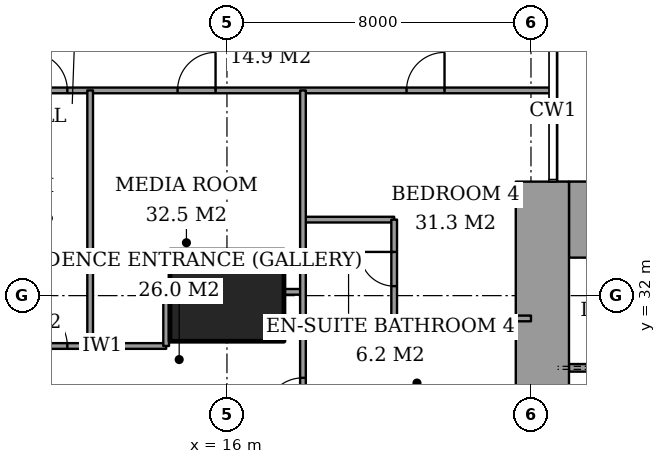
"""IFC4 building model, lengths in metres.
Left out: names, types, materials, properties, quantities, classifications, styles, units other than length and angle.
Written with IfcOpenShell. Run it as: python <this file> out.ifc"""

import sys

from ifc_helpers import new_model, si_unit, direction, frame, frame_2d, origin, origin_2d, place, context, subcontext, project, spatial, rectangle, extrude, element, fill, save


model = new_model("IFC4")
c1 = context("Model", 3, precision=1e-05, world=origin(), true_north=direction((0.0, 1.0)))
c2 = subcontext(c1, "Body", "Model", "MODEL_VIEW")
j1 = project(units=[si_unit("LENGTHUNIT", "METRE"), si_unit("PLANEANGLEUNIT", "RADIAN")], contexts=[c1])
p1 = place(None, origin())
s1 = spatial("IfcSite", under=j1, at=p1, CompositionType="ELEMENT")
p2 = place(p1, origin())
s2 = spatial("IfcBuilding", under=s1, at=p2, CompositionType="ELEMENT")
p3 = place(p2, frame((0.0, 0.0, 196.6)))
s3 = spatial("IfcBuildingStorey", under=s2, at=p3, CompositionType="ELEMENT", Elevation=196.6)
p4 = place(p3, frame((16.0, 32.0, 0.0), z_axis=(0.0, 0.0, 1.0), x_axis=(1.0, 0.0, 0.0)))
e1 = element("IfcColumn", 1, at=p4, inside=s3, PredefinedType="COLUMN", context=c2, shape_type="SweptSolid", body=[
    extrude(rectangle(XDim=3.0, YDim=2.4, at=origin_2d()), origin(), (0.0, 0.0, 1.0), 3.6),
])
p5 = place(p3, frame((25.0, 34.0, 0.0), z_axis=(0.0, 0.0, 1.0), x_axis=(1.0, 0.0, 0.0)))
e2 = element("IfcWall", 2, at=p5, inside=s3, PredefinedType="SHEAR", context=c2, shape_type="SweptSolid", body=[
    extrude(rectangle(XDim=3.15, YDim=2.0, at=frame_2d((1.575, 0.0))), origin(), (0.0, 0.0, 1.0), 3.6),
])
p6 = place(p3, frame((24.3, 23.15, 0.0), z_axis=(0.0, 0.0, 1.0), x_axis=(0.0, 1.0, 0.0)))
e3 = element("IfcWall", 3, at=p6, inside=s3, PredefinedType="SHEAR", context=c2, shape_type="SweptSolid", body=[
    extrude(rectangle(XDim=11.85, YDim=1.4, at=frame_2d((5.925, 0.0))), origin(), (0.0, 0.0, 1.0), 3.6),
])
p7 = place(p6, frame((0.75, 0.0, 0.0)))
e4 = element("IfcOpeningElement", 4, at=p7, cuts=e3, PredefinedType="OPENING", context=c2, shape_type="SweptSolid", body=[
    extrude(rectangle(XDim=1.8, YDim=2.4, at=frame_2d((0.9, 1.2))), frame((0.0, 0.71, 0.0), z_axis=(0.0, -1.0, 0.0), x_axis=(1.0, 0.0, 0.0)), (0.0, 0.0, 1.0), 1.42),
])
p8 = place(p3, frame((10.2, 30.675, 0.0), z_axis=(0.0, 0.0, 1.0), x_axis=(1.0, 0.0, 0.0)))
e5 = element("IfcWall", 5, at=p8, inside=s3, PredefinedType="PARTITIONING", context=c2, shape_type="SweptSolid", body=[
    extrude(rectangle(XDim=4.2, YDim=0.15, at=frame_2d((2.1, 0.0))), origin(), (0.0, 0.0, 1.0), 3.35),
])
p9 = place(p8, frame((0.6, 0.0, 0.0)))
e6 = element("IfcOpeningElement", 6, at=p9, cuts=e5, PredefinedType="OPENING", context=c2, shape_type="SweptSolid", body=[
    extrude(rectangle(XDim=1.0, YDim=2.1, at=frame_2d((0.5, 1.05))), frame((0.0, 0.085, 0.0), z_axis=(0.0, -1.0, 0.0), x_axis=(1.0, 0.0, 0.0)), (0.0, 0.0, 1.0), 0.17),
])
p10 = place(p3, frame((18.0, 31.4, 0.0), z_axis=(0.0, 0.0, 1.0), x_axis=(1.0, 0.0, 0.0)))
e7 = element("IfcWall", 7, at=p10, inside=s3, PredefinedType="PARTITIONING", context=c2, shape_type="SweptSolid", body=[
    extrude(rectangle(XDim=6.0, YDim=0.15, at=frame_2d((3.0, 0.0))), origin(), (0.0, 0.0, 1.0), 3.35),
])
p11 = place(p3, frame((17.5, 32.1, 0.0), z_axis=(0.0, 0.0, 1.0), x_axis=(1.0, 0.0, 0.0)))
e8 = element("IfcWall", 8, at=p11, inside=s3, PredefinedType="PARTITIONING", context=c2, shape_type="SweptSolid", body=[
    extrude(rectangle(XDim=0.5, YDim=0.15, at=frame_2d((0.25, 0.0))), origin(), (0.0, 0.0, 1.0), 3.35),
])
p12 = place(p3, frame((18.0, 34.0, 0.0), z_axis=(0.0, 0.0, 1.0), x_axis=(1.0, 0.0, 0.0)))
e9 = element("IfcWall", 9, at=p12, inside=s3, PredefinedType="PARTITIONING", context=c2, shape_type="SweptSolid", body=[
    extrude(rectangle(XDim=2.4, YDim=0.15, at=frame_2d((1.2, 0.0))), origin(), (0.0, 0.0, 1.0), 3.35),
])
p13 = place(p3, frame((-0.45, 37.4, 0.0), z_axis=(0.0, 0.0, 1.0), x_axis=(1.0, 0.0, 0.0)))
e10 = element("IfcWall", 10, at=p13, inside=s3, PredefinedType="PARTITIONING", context=c2, shape_type="SweptSolid", body=[
    extrude(rectangle(XDim=25.011, YDim=0.15, at=frame_2d((12.505, 0.0))), origin(), (0.0, 0.0, 1.0), 3.35),
])
p14 = place(p13, frame((11.25, 0.0, 0.0)))
e11 = element("IfcOpeningElement", 11, at=p14, cuts=e10, PredefinedType="OPENING", context=c2, shape_type="SweptSolid", body=[
    extrude(rectangle(XDim=1.0, YDim=2.1, at=frame_2d((0.5, 1.05))), frame((0.0, 0.085, 0.0), z_axis=(0.0, -1.0, 0.0), x_axis=(1.0, 0.0, 0.0)), (0.0, 0.0, 1.0), 0.17),
])
p15 = place(p13, frame((3.087, 0.0, 0.0)))
e12 = element("IfcOpeningElement", 12, at=p15, cuts=e10, PredefinedType="OPENING", context=c2, shape_type="SweptSolid", body=[
    extrude(rectangle(XDim=1.0, YDim=2.1, at=frame_2d((0.5, 1.05))), frame((0.0, 0.085, 0.0), z_axis=(0.0, -1.0, 0.0), x_axis=(1.0, 0.0, 0.0)), (0.0, 0.0, 1.0), 0.17),
])
p16 = place(p13, frame((8.462, 0.0, 0.0)))
e13 = element("IfcOpeningElement", 13, at=p16, cuts=e10, PredefinedType="OPENING", context=c2, shape_type="SweptSolid", body=[
    extrude(rectangle(XDim=0.9, YDim=2.1, at=frame_2d((0.45, 1.05))), frame((0.0, 0.085, 0.0), z_axis=(0.0, -1.0, 0.0), x_axis=(1.0, 0.0, 0.0)), (0.0, 0.0, 1.0), 0.17),
])
p17 = place(p13, frame((15.15, 0.0, 0.0)))
e14 = element("IfcOpeningElement", 14, at=p17, cuts=e10, PredefinedType="OPENING", context=c2, shape_type="SweptSolid", body=[
    extrude(rectangle(XDim=1.0, YDim=2.1, at=frame_2d((0.5, 1.05))), frame((0.0, 0.085, 0.0), z_axis=(0.0, -1.0, 0.0), x_axis=(1.0, 0.0, 0.0)), (0.0, 0.0, 1.0), 0.17),
])
p18 = place(p13, frame((21.175, 0.0, 0.0)))
e15 = element("IfcOpeningElement", 15, at=p18, cuts=e10, PredefinedType="OPENING", context=c2, shape_type="SweptSolid", body=[
    extrude(rectangle(XDim=1.0, YDim=2.1, at=frame_2d((0.5, 1.05))), frame((0.0, 0.085, 0.0), z_axis=(0.0, -1.0, 0.0), x_axis=(1.0, 0.0, 0.0)), (0.0, 0.0, 1.0), 0.17),
])
p19 = place(p3, frame((12.4, 30.675, 0.0), z_axis=(0.0, 0.0, 1.0), x_axis=(0.0, 1.0, 0.0)))
e16 = element("IfcWall", 16, at=p19, inside=s3, PredefinedType="PARTITIONING", context=c2, shape_type="SweptSolid", body=[
    extrude(rectangle(XDim=6.725, YDim=0.15, at=frame_2d((3.362, 0.0))), origin(), (0.0, 0.0, 1.0), 3.35),
])
p20 = place(p3, frame((14.4, 30.675, 0.0), z_axis=(0.0, 0.0, 1.0), x_axis=(0.0, 1.0, 0.0)))
e17 = element("IfcWall", 17, at=p20, inside=s3, PredefinedType="PARTITIONING", context=c2, shape_type="SweptSolid", body=[
    extrude(rectangle(XDim=1.425, YDim=0.15, at=frame_2d((0.712, 0.0))), origin(), (0.0, 0.0, 1.0), 3.35),
])
p21 = place(p3, frame((18.0, 28.0, 0.0), z_axis=(0.0, 0.0, 1.0), x_axis=(0.0, 1.0, 0.0)))
e18 = element("IfcWall", 18, at=p21, inside=s3, PredefinedType="PARTITIONING", context=c2, shape_type="SweptSolid", body=[
    extrude(rectangle(XDim=9.4, YDim=0.15, at=frame_2d((4.7, 0.0))), origin(), (0.0, 0.0, 1.0), 3.35),
])
p22 = place(p21, frame((0.837, 0.0, 0.0)))
e19 = element("IfcOpeningElement", 19, at=p22, cuts=e18, PredefinedType="OPENING", context=c2, shape_type="SweptSolid", body=[
    extrude(rectangle(XDim=1.0, YDim=2.1, at=frame_2d((0.5, 1.05))), frame((0.0, 0.085, 0.0), z_axis=(0.0, -1.0, 0.0), x_axis=(1.0, 0.0, 0.0)), (0.0, 0.0, 1.0), 0.17),
])
p23 = place(p3, frame((20.4, 31.4, 0.0), z_axis=(0.0, 0.0, 1.0), x_axis=(0.0, 1.0, 0.0)))
e20 = element("IfcWall", 20, at=p23, inside=s3, PredefinedType="PARTITIONING", context=c2, shape_type="SweptSolid", body=[
    extrude(rectangle(XDim=2.6, YDim=0.15, at=frame_2d((1.3, 0.0))), origin(), (0.0, 0.0, 1.0), 3.35),
])
p24 = place(p23, frame((0.85, 0.0, 0.0)))
e21 = element("IfcOpeningElement", 21, at=p24, cuts=e20, PredefinedType="OPENING", context=c2, shape_type="SweptSolid", body=[
    extrude(rectangle(XDim=0.9, YDim=2.1, at=frame_2d((0.45, 1.05))), frame((0.0, 0.085, 0.0), z_axis=(0.0, -1.0, 0.0), x_axis=(1.0, 0.0, 0.0)), (0.0, 0.0, 1.0), 0.17),
])
p25 = place(p3, frame((25.0, 30.1, 0.0), z_axis=(0.0, 0.0, 1.0), x_axis=(1.0, 0.0, 0.0)))
e22 = element("IfcWall", 22, at=p25, inside=s3, PredefinedType="PARTITIONING", context=c2, shape_type="SweptSolid", body=[
    extrude(rectangle(XDim=12.7, YDim=0.2, at=frame_2d((6.35, 0.0))), origin(), (0.0, 0.0, 1.0), 3.6),
])
p26 = place(p25, frame((4.25, 0.0, 0.0)))
e23 = element("IfcOpeningElement", 23, at=p26, cuts=e22, PredefinedType="OPENING", context=c2, shape_type="SweptSolid", body=[
    extrude(rectangle(XDim=1.1, YDim=2.1, at=frame_2d((0.55, 1.05))), frame((0.0, 0.11, 0.0), z_axis=(0.0, -1.0, 0.0), x_axis=(1.0, 0.0, 0.0)), (0.0, 0.0, 1.0), 0.22),
])
p27 = place(p25, frame((7.45, 0.0, 0.0)))
e24 = element("IfcOpeningElement", 24, at=p27, cuts=e22, PredefinedType="OPENING", context=c2, shape_type="SweptSolid", body=[
    extrude(rectangle(XDim=1.1, YDim=2.1, at=frame_2d((0.55, 1.05))), frame((0.0, 0.11, 0.0), z_axis=(0.0, -1.0, 0.0), x_axis=(1.0, 0.0, 0.0)), (0.0, 0.0, 1.0), 0.22),
])
p28 = place(p25, frame((10.65, 0.0, 0.0)))
e25 = element("IfcOpeningElement", 25, at=p28, cuts=e22, PredefinedType="OPENING", context=c2, shape_type="SweptSolid", body=[
    extrude(rectangle(XDim=1.1, YDim=2.1, at=frame_2d((0.55, 1.05))), frame((0.0, 0.11, 0.0), z_axis=(0.0, -1.0, 0.0), x_axis=(1.0, 0.0, 0.0)), (0.0, 0.0, 1.0), 0.22),
])
p29 = place(p25, frame((0.9, 0.0, 0.0)))
e26 = element("IfcOpeningElement", 26, at=p29, cuts=e22, PredefinedType="OPENING", context=c2, shape_type="SweptSolid", body=[
    extrude(rectangle(XDim=1.2, YDim=2.1, at=frame_2d((0.6, 1.05))), frame((0.0, 0.11, 0.0), z_axis=(0.0, -1.0, 0.0), x_axis=(1.0, 0.0, 0.0)), (0.0, 0.0, 1.0), 0.22),
])
p30 = place(p14, origin())
e27 = element("IfcDoor", 27, at=p30, inside=s3, OperationType="SINGLE_SWING_RIGHT", PredefinedType="DOOR", context=c2, shape_type="SweptSolid", body=[
    extrude(rectangle(XDim=1.0, YDim=2.1, at=frame_2d((0.5, 1.05))), frame((0.0, 0.025, 0.0), z_axis=(0.0, -1.0, 0.0), x_axis=(1.0, 0.0, 0.0)), (0.0, 0.0, 1.0), 0.05),
])
fill(e11, e27)
p31 = place(p9, origin())
e28 = element("IfcDoor", 28, at=p31, inside=s3, OperationType="SINGLE_SWING_RIGHT", PredefinedType="DOOR", context=c2, shape_type="SweptSolid", body=[
    extrude(rectangle(XDim=1.0, YDim=2.1, at=frame_2d((0.5, 1.05))), frame((0.0, 0.025, 0.0), z_axis=(0.0, -1.0, 0.0), x_axis=(1.0, 0.0, 0.0)), (0.0, 0.0, 1.0), 0.05),
])
fill(e6, e28)
p32 = place(p17, origin())
e29 = element("IfcDoor", 29, at=p32, inside=s3, OperationType="SINGLE_SWING_LEFT", PredefinedType="DOOR", context=c2, shape_type="SweptSolid", body=[
    extrude(rectangle(XDim=1.0, YDim=2.1, at=frame_2d((0.5, 1.05))), frame((0.0, 0.025, 0.0), z_axis=(0.0, -1.0, 0.0), x_axis=(1.0, 0.0, 0.0)), (0.0, 0.0, 1.0), 0.05),
])
fill(e14, e29)
p33 = place(p24, origin())
e30 = element("IfcDoor", 30, at=p33, inside=s3, OperationType="SINGLE_SWING_LEFT", PredefinedType="DOOR", context=c2, shape_type="SweptSolid", body=[
    extrude(rectangle(XDim=0.9, YDim=2.1, at=frame_2d((0.45, 1.05))), frame((0.0, 0.025, 0.0), z_axis=(0.0, -1.0, 0.0), x_axis=(1.0, 0.0, 0.0)), (0.0, 0.0, 1.0), 0.05),
])
fill(e21, e30)
p34 = place(p18, origin())
e31 = element("IfcDoor", 31, at=p34, inside=s3, OperationType="SINGLE_SWING_LEFT", PredefinedType="DOOR", context=c2, shape_type="SweptSolid", body=[
    extrude(rectangle(XDim=1.0, YDim=2.1, at=frame_2d((0.5, 1.05))), frame((0.0, 0.025, 0.0), z_axis=(0.0, -1.0, 0.0), x_axis=(1.0, 0.0, 0.0)), (0.0, 0.0, 1.0), 0.05),
])
fill(e15, e31)
p35 = place(p22, origin())
e32 = element("IfcDoor", 32, at=p35, inside=s3, OperationType="SINGLE_SWING_RIGHT", PredefinedType="DOOR", context=c2, shape_type="SweptSolid", body=[
    extrude(rectangle(XDim=1.0, YDim=2.1, at=frame_2d((0.5, 1.05))), frame((0.0, 0.025, 0.0), z_axis=(0.0, -1.0, 0.0), x_axis=(1.0, 0.0, 0.0)), (0.0, 0.0, 1.0), 0.05),
])
fill(e19, e32)
save(model, sys.argv[1])
